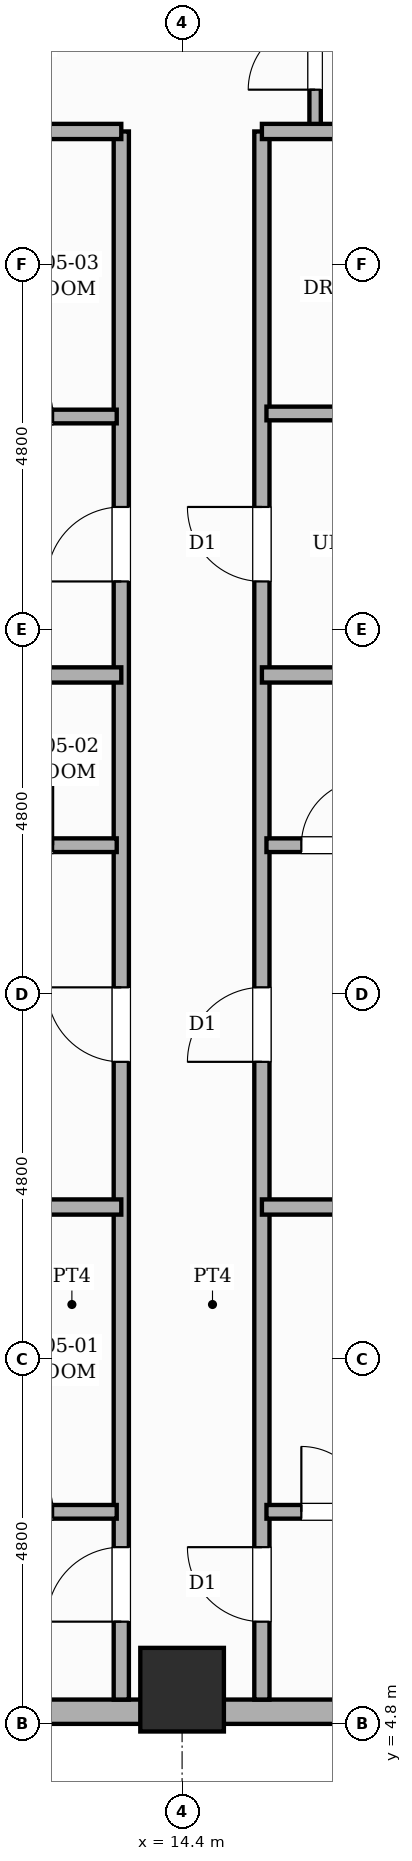
"""IFC4 building model, lengths in metres.
Left out: names, types, materials, properties, quantities, classifications, styles, units other than length and angle.
Written with IfcOpenShell. Run it as: python <this file> out.ifc"""

import sys

from ifc_helpers import new_model, si_unit, direction, frame, frame_2d, origin, origin_2d, place, context, subcontext, project, spatial, rectangle, extrude, element, fill, save


model = new_model("IFC4")
c1 = context("Model", 3, precision=1e-05, world=origin(), true_north=direction((0.0, 1.0)))
c2 = subcontext(c1, "Body", "Model", "MODEL_VIEW")
j1 = project(units=[si_unit("LENGTHUNIT", "METRE"), si_unit("PLANEANGLEUNIT", "RADIAN")], contexts=[c1])
p1 = place(None, origin())
s1 = spatial("IfcSite", under=j1, at=p1, CompositionType="ELEMENT")
p2 = place(p1, origin())
s2 = spatial("IfcBuilding", under=s1, at=p2, CompositionType="ELEMENT")
p3 = place(p2, frame((0.0, 0.0, 25.0)))
s3 = spatial("IfcBuildingStorey", under=s2, at=p3, CompositionType="ELEMENT", Elevation=25.0)
p4 = place(p3, frame((14.4, 5.25, 0.0), z_axis=(0.0, 0.0, 1.0), x_axis=(1.0, 0.0, 0.0)))
e1 = element("IfcColumn", 1, at=p4, inside=s3, PredefinedType="COLUMN", context=c2, shape_type="SweptSolid", body=[
    extrude(rectangle(XDim=1.1, YDim=1.1, at=origin_2d()), origin(), (0.0, 0.0, 1.0), 3.6),
])
p5 = place(p3, frame((21.6, 4.96, 0.0), z_axis=(0.0, 0.0, 1.0), x_axis=(-1.0, 0.0, 0.0)))
e2 = element("IfcWall", 2, at=p5, inside=s3, PredefinedType="STANDARD", context=c2, shape_type="SweptSolid", body=[
    extrude(rectangle(XDim=14.4, YDim=0.32, at=frame_2d((7.2, 0.0))), origin(), (0.0, 0.0, 1.0), 2.53),
])
p6 = place(p5, frame((9.015, 0.0, 0.65)))
e3 = element("IfcOpeningElement", 3, at=p6, cuts=e2, PredefinedType="OPENING", context=c2, shape_type="SweptSolid", body=[
    extrude(rectangle(XDim=1.4, YDim=1.1, at=frame_2d((0.7, 0.55))), frame((0.0, 0.17, 0.0), z_axis=(0.0, -1.0, 0.0), x_axis=(1.0, 0.0, 0.0)), (0.0, 0.0, 1.0), 0.34),
])
p7 = place(p5, frame((0.47, 0.0, 0.45)))
e4 = element("IfcOpeningElement", 4, at=p7, cuts=e2, PredefinedType="OPENING", context=c2, shape_type="SweptSolid", body=[
    extrude(rectangle(XDim=0.95, YDim=1.8, at=frame_2d((0.475, 0.9))), frame((0.0, 0.17, 0.0), z_axis=(0.0, -1.0, 0.0), x_axis=(1.0, 0.0, 0.0)), (0.0, 0.0, 1.0), 0.34),
])
p8 = place(p3, frame((16.15, 25.75, 0.0), z_axis=(0.0, 0.0, 1.0), x_axis=(0.0, 1.0, 0.0)))
e5 = element("IfcWall", 5, at=p8, inside=s3, PredefinedType="PARTITIONING", context=c2, shape_type="SweptSolid", body=[
    extrude(rectangle(XDim=2.25, YDim=0.15, at=frame_2d((1.125, 0.0))), origin(), (0.0, 0.0, 1.0), 3.35),
])
p9 = place(p8, frame((0.55, 0.0, 0.0)))
e6 = element("IfcOpeningElement", 6, at=p9, cuts=e5, PredefinedType="OPENING", context=c2, shape_type="SweptSolid", body=[
    extrude(rectangle(XDim=0.88, YDim=2.1, at=frame_2d((0.44, 1.05))), frame((0.0, 0.085, 0.0), z_axis=(0.0, -1.0, 0.0), x_axis=(1.0, 0.0, 0.0)), (0.0, 0.0, 1.0), 0.17),
])
p10 = place(p3, frame((13.6, 5.12, 0.0), z_axis=(0.0, 0.0, 1.0), x_axis=(0.0, 1.0, 0.0)))
e7 = element("IfcWall", 7, at=p10, inside=s3, PredefinedType="PARTITIONING", context=c2, shape_type="SweptSolid", body=[
    extrude(rectangle(XDim=20.63, YDim=0.2, at=frame_2d((10.315, 0.0))), origin(), (0.0, 0.0, 1.0), 3.35),
])
p11 = place(p10, frame((1.025, 0.0, 0.0)))
e8 = element("IfcOpeningElement", 8, at=p11, cuts=e7, PredefinedType="OPENING", context=c2, shape_type="SweptSolid", body=[
    extrude(rectangle(XDim=0.98, YDim=2.18, at=frame_2d((0.49, 1.09))), frame((0.0, 0.11, 0.0), z_axis=(0.0, -1.0, 0.0), x_axis=(1.0, 0.0, 0.0)), (0.0, 0.0, 1.0), 0.22),
])
p12 = place(p10, frame((8.39, 0.0, 0.0)))
e9 = element("IfcOpeningElement", 9, at=p12, cuts=e7, PredefinedType="OPENING", context=c2, shape_type="SweptSolid", body=[
    extrude(rectangle(XDim=0.98, YDim=2.18, at=frame_2d((0.49, 1.09))), frame((0.0, 0.11, 0.0), z_axis=(0.0, -1.0, 0.0), x_axis=(1.0, 0.0, 0.0)), (0.0, 0.0, 1.0), 0.22),
])
p13 = place(p10, frame((14.71, 0.0, 0.0)))
e10 = element("IfcOpeningElement", 10, at=p13, cuts=e7, PredefinedType="OPENING", context=c2, shape_type="SweptSolid", body=[
    extrude(rectangle(XDim=0.98, YDim=2.18, at=frame_2d((0.49, 1.09))), frame((0.0, 0.11, 0.0), z_axis=(0.0, -1.0, 0.0), x_axis=(1.0, 0.0, 0.0)), (0.0, 0.0, 1.0), 0.22),
])
p14 = place(p3, frame((15.45, 5.12, 0.0), z_axis=(0.0, 0.0, 1.0), x_axis=(0.0, 1.0, 0.0)))
e11 = element("IfcWall", 11, at=p14, inside=s3, PredefinedType="PARTITIONING", context=c2, shape_type="SweptSolid", body=[
    extrude(rectangle(XDim=20.63, YDim=0.2, at=frame_2d((10.315, 0.0))), origin(), (0.0, 0.0, 1.0), 3.35),
])
p15 = place(p14, frame((1.025, 0.0, 0.0)))
e12 = element("IfcOpeningElement", 12, at=p15, cuts=e11, PredefinedType="OPENING", context=c2, shape_type="SweptSolid", body=[
    extrude(rectangle(XDim=0.98, YDim=2.18, at=frame_2d((0.49, 1.09))), frame((0.0, 0.11, 0.0), z_axis=(0.0, -1.0, 0.0), x_axis=(1.0, 0.0, 0.0)), (0.0, 0.0, 1.0), 0.22),
])
p16 = place(p14, frame((8.39, 0.0, 0.0)))
e13 = element("IfcOpeningElement", 13, at=p16, cuts=e11, PredefinedType="OPENING", context=c2, shape_type="SweptSolid", body=[
    extrude(rectangle(XDim=0.98, YDim=2.18, at=frame_2d((0.49, 1.09))), frame((0.0, 0.11, 0.0), z_axis=(0.0, -1.0, 0.0), x_axis=(1.0, 0.0, 0.0)), (0.0, 0.0, 1.0), 0.22),
])
p17 = place(p14, frame((14.71, 0.0, 0.0)))
e14 = element("IfcOpeningElement", 14, at=p17, cuts=e11, PredefinedType="OPENING", context=c2, shape_type="SweptSolid", body=[
    extrude(rectangle(XDim=0.98, YDim=2.18, at=frame_2d((0.49, 1.09))), frame((0.0, 0.11, 0.0), z_axis=(0.0, -1.0, 0.0), x_axis=(1.0, 0.0, 0.0)), (0.0, 0.0, 1.0), 0.22),
])
p18 = place(p3, frame((5.12, 25.75, 0.0), z_axis=(0.0, 0.0, 1.0), x_axis=(1.0, 0.0, 0.0)))
e15 = element("IfcWall", 15, at=p18, inside=s3, PredefinedType="PARTITIONING", context=c2, shape_type="SweptSolid", body=[
    extrude(rectangle(XDim=8.48, YDim=0.2, at=frame_2d((4.24, 0.0))), origin(), (0.0, 0.0, 1.0), 3.35),
])
p19 = place(p3, frame((15.45, 25.75, 0.0), z_axis=(0.0, 0.0, 1.0), x_axis=(1.0, 0.0, 0.0)))
e16 = element("IfcWall", 16, at=p19, inside=s3, PredefinedType="PARTITIONING", context=c2, shape_type="SweptSolid", body=[
    extrude(rectangle(XDim=8.23, YDim=0.2, at=frame_2d((4.115, 0.0))), origin(), (0.0, 0.0, 1.0), 3.35),
])
p20 = place(p3, frame((5.12, 7.59, 0.0), z_axis=(0.0, 0.0, 1.0), x_axis=(1.0, 0.0, 0.0)))
e17 = element("IfcWall", 17, at=p20, inside=s3, PredefinedType="PLUMBINGWALL", context=c2, shape_type="SweptSolid", body=[
    extrude(rectangle(XDim=8.42, YDim=0.18, at=frame_2d((4.21, 0.0))), origin(), (0.0, 0.0, 1.0), 3.35),
])
p21 = place(p20, frame((1.046, 0.0, 0.0)))
e18 = element("IfcOpeningElement", 18, at=p21, cuts=e17, PredefinedType="OPENING", context=c2, shape_type="SweptSolid", body=[
    extrude(rectangle(XDim=0.9, YDim=2.15, at=frame_2d((0.45, 1.075))), frame((0.0, 0.1, 0.0), z_axis=(0.0, -1.0, 0.0), x_axis=(1.0, 0.0, 0.0)), (0.0, 0.0, 1.0), 0.2),
])
p22 = place(p20, frame((4.307, 0.0, 0.0)))
e19 = element("IfcOpeningElement", 19, at=p22, cuts=e17, PredefinedType="OPENING", context=c2, shape_type="SweptSolid", body=[
    extrude(rectangle(XDim=0.9, YDim=2.15, at=frame_2d((0.45, 1.075))), frame((0.0, 0.1, 0.0), z_axis=(0.0, -1.0, 0.0), x_axis=(1.0, 0.0, 0.0)), (0.0, 0.0, 1.0), 0.2),
])
p23 = place(p20, frame((6.723, 0.0, 0.0)))
e20 = element("IfcOpeningElement", 20, at=p23, cuts=e17, PredefinedType="OPENING", context=c2, shape_type="SweptSolid", body=[
    extrude(rectangle(XDim=0.86, YDim=2.1, at=frame_2d((0.43, 1.05))), frame((0.0, 0.1, 0.0), z_axis=(0.0, -1.0, 0.0), x_axis=(1.0, 0.0, 0.0)), (0.0, 0.0, 1.0), 0.2),
])
p24 = place(p3, frame((5.12, 11.6, 0.0), z_axis=(0.0, 0.0, 1.0), x_axis=(1.0, 0.0, 0.0)))
e21 = element("IfcWall", 21, at=p24, inside=s3, PredefinedType="SOLIDWALL", context=c2, shape_type="SweptSolid", body=[
    extrude(rectangle(XDim=8.48, YDim=0.2, at=frame_2d((4.24, 0.0))), origin(), (0.0, 0.0, 1.0), 3.35),
])
p25 = place(p3, frame((5.12, 16.36, 0.0), z_axis=(0.0, 0.0, 1.0), x_axis=(1.0, 0.0, 0.0)))
e22 = element("IfcWall", 22, at=p25, inside=s3, PredefinedType="PLUMBINGWALL", context=c2, shape_type="SweptSolid", body=[
    extrude(rectangle(XDim=8.42, YDim=0.18, at=frame_2d((4.21, 0.0))), origin(), (0.0, 0.0, 1.0), 3.35),
])
p26 = place(p25, frame((1.046, 0.0, 0.0)))
e23 = element("IfcOpeningElement", 23, at=p26, cuts=e22, PredefinedType="OPENING", context=c2, shape_type="SweptSolid", body=[
    extrude(rectangle(XDim=0.9, YDim=2.15, at=frame_2d((0.45, 1.075))), frame((0.0, 0.1, 0.0), z_axis=(0.0, -1.0, 0.0), x_axis=(1.0, 0.0, 0.0)), (0.0, 0.0, 1.0), 0.2),
])
p27 = place(p25, frame((4.307, 0.0, 0.0)))
e24 = element("IfcOpeningElement", 24, at=p27, cuts=e22, PredefinedType="OPENING", context=c2, shape_type="SweptSolid", body=[
    extrude(rectangle(XDim=0.9, YDim=2.15, at=frame_2d((0.45, 1.075))), frame((0.0, 0.1, 0.0), z_axis=(0.0, -1.0, 0.0), x_axis=(1.0, 0.0, 0.0)), (0.0, 0.0, 1.0), 0.2),
])
p28 = place(p25, frame((6.723, 0.0, 0.0)))
e25 = element("IfcOpeningElement", 25, at=p28, cuts=e22, PredefinedType="OPENING", context=c2, shape_type="SweptSolid", body=[
    extrude(rectangle(XDim=0.86, YDim=2.1, at=frame_2d((0.43, 1.05))), frame((0.0, 0.1, 0.0), z_axis=(0.0, -1.0, 0.0), x_axis=(1.0, 0.0, 0.0)), (0.0, 0.0, 1.0), 0.2),
])
p29 = place(p3, frame((5.12, 18.6, 0.0), z_axis=(0.0, 0.0, 1.0), x_axis=(1.0, 0.0, 0.0)))
e26 = element("IfcWall", 26, at=p29, inside=s3, PredefinedType="SOLIDWALL", context=c2, shape_type="SweptSolid", body=[
    extrude(rectangle(XDim=8.48, YDim=0.2, at=frame_2d((4.24, 0.0))), origin(), (0.0, 0.0, 1.0), 3.35),
])
p30 = place(p3, frame((5.12, 22.0, 0.0), z_axis=(0.0, 0.0, 1.0), x_axis=(1.0, 0.0, 0.0)))
e27 = element("IfcWall", 27, at=p30, inside=s3, PredefinedType="PLUMBINGWALL", context=c2, shape_type="SweptSolid", body=[
    extrude(rectangle(XDim=8.42, YDim=0.18, at=frame_2d((4.21, 0.0))), origin(), (0.0, 0.0, 1.0), 3.35),
])
p31 = place(p30, frame((1.046, 0.0, 0.0)))
e28 = element("IfcOpeningElement", 28, at=p31, cuts=e27, PredefinedType="OPENING", context=c2, shape_type="SweptSolid", body=[
    extrude(rectangle(XDim=0.9, YDim=2.15, at=frame_2d((0.45, 1.075))), frame((0.0, 0.1, 0.0), z_axis=(0.0, -1.0, 0.0), x_axis=(1.0, 0.0, 0.0)), (0.0, 0.0, 1.0), 0.2),
])
p32 = place(p30, frame((4.307, 0.0, 0.0)))
e29 = element("IfcOpeningElement", 29, at=p32, cuts=e27, PredefinedType="OPENING", context=c2, shape_type="SweptSolid", body=[
    extrude(rectangle(XDim=0.9, YDim=2.15, at=frame_2d((0.45, 1.075))), frame((0.0, 0.1, 0.0), z_axis=(0.0, -1.0, 0.0), x_axis=(1.0, 0.0, 0.0)), (0.0, 0.0, 1.0), 0.2),
])
p33 = place(p30, frame((6.723, 0.0, 0.0)))
e30 = element("IfcOpeningElement", 30, at=p33, cuts=e27, PredefinedType="OPENING", context=c2, shape_type="SweptSolid", body=[
    extrude(rectangle(XDim=0.86, YDim=2.1, at=frame_2d((0.43, 1.05))), frame((0.0, 0.1, 0.0), z_axis=(0.0, -1.0, 0.0), x_axis=(1.0, 0.0, 0.0)), (0.0, 0.0, 1.0), 0.2),
])
p34 = place(p3, frame((15.51, 7.59, 0.0), z_axis=(0.0, 0.0, 1.0), x_axis=(1.0, 0.0, 0.0)))
e31 = element("IfcWall", 31, at=p34, inside=s3, PredefinedType="PLUMBINGWALL", context=c2, shape_type="SweptSolid", body=[
    extrude(rectangle(XDim=8.17, YDim=0.18, at=frame_2d((4.085, 0.0))), origin(), (0.0, 0.0, 1.0), 3.35),
])
p35 = place(p34, frame((0.459, 0.0, 0.0)))
e32 = element("IfcOpeningElement", 32, at=p35, cuts=e31, PredefinedType="OPENING", context=c2, shape_type="SweptSolid", body=[
    extrude(rectangle(XDim=0.86, YDim=2.1, at=frame_2d((0.43, 1.05))), frame((0.0, 0.1, 0.0), z_axis=(0.0, -1.0, 0.0), x_axis=(1.0, 0.0, 0.0)), (0.0, 0.0, 1.0), 0.2),
])
p36 = place(p34, frame((2.722, 0.0, 0.0)))
e33 = element("IfcOpeningElement", 33, at=p36, cuts=e31, PredefinedType="OPENING", context=c2, shape_type="SweptSolid", body=[
    extrude(rectangle(XDim=0.9, YDim=2.15, at=frame_2d((0.45, 1.075))), frame((0.0, 0.1, 0.0), z_axis=(0.0, -1.0, 0.0), x_axis=(1.0, 0.0, 0.0)), (0.0, 0.0, 1.0), 0.2),
])
p37 = place(p34, frame((5.766, 0.0, 0.0)))
e34 = element("IfcOpeningElement", 34, at=p37, cuts=e31, PredefinedType="OPENING", context=c2, shape_type="SweptSolid", body=[
    extrude(rectangle(XDim=0.9, YDim=2.15, at=frame_2d((0.45, 1.075))), frame((0.0, 0.1, 0.0), z_axis=(0.0, -1.0, 0.0), x_axis=(1.0, 0.0, 0.0)), (0.0, 0.0, 1.0), 0.2),
])
p38 = place(p3, frame((15.45, 11.6, 0.0), z_axis=(0.0, 0.0, 1.0), x_axis=(1.0, 0.0, 0.0)))
e35 = element("IfcWall", 35, at=p38, inside=s3, PredefinedType="SOLIDWALL", context=c2, shape_type="SweptSolid", body=[
    extrude(rectangle(XDim=8.23, YDim=0.2, at=frame_2d((4.115, 0.0))), origin(), (0.0, 0.0, 1.0), 3.35),
])
p39 = place(p3, frame((15.51, 16.36, 0.0), z_axis=(0.0, 0.0, 1.0), x_axis=(1.0, 0.0, 0.0)))
e36 = element("IfcWall", 36, at=p39, inside=s3, PredefinedType="PLUMBINGWALL", context=c2, shape_type="SweptSolid", body=[
    extrude(rectangle(XDim=8.17, YDim=0.18, at=frame_2d((4.085, 0.0))), origin(), (0.0, 0.0, 1.0), 3.35),
])
p40 = place(p39, frame((0.459, 0.0, 0.0)))
e37 = element("IfcOpeningElement", 37, at=p40, cuts=e36, PredefinedType="OPENING", context=c2, shape_type="SweptSolid", body=[
    extrude(rectangle(XDim=0.86, YDim=2.1, at=frame_2d((0.43, 1.05))), frame((0.0, 0.1, 0.0), z_axis=(0.0, -1.0, 0.0), x_axis=(1.0, 0.0, 0.0)), (0.0, 0.0, 1.0), 0.2),
])
p41 = place(p39, frame((2.722, 0.0, 0.0)))
e38 = element("IfcOpeningElement", 38, at=p41, cuts=e36, PredefinedType="OPENING", context=c2, shape_type="SweptSolid", body=[
    extrude(rectangle(XDim=0.9, YDim=2.15, at=frame_2d((0.45, 1.075))), frame((0.0, 0.1, 0.0), z_axis=(0.0, -1.0, 0.0), x_axis=(1.0, 0.0, 0.0)), (0.0, 0.0, 1.0), 0.2),
])
p42 = place(p39, frame((5.766, 0.0, 0.0)))
e39 = element("IfcOpeningElement", 39, at=p42, cuts=e36, PredefinedType="OPENING", context=c2, shape_type="SweptSolid", body=[
    extrude(rectangle(XDim=0.9, YDim=2.15, at=frame_2d((0.45, 1.075))), frame((0.0, 0.1, 0.0), z_axis=(0.0, -1.0, 0.0), x_axis=(1.0, 0.0, 0.0)), (0.0, 0.0, 1.0), 0.2),
])
p43 = place(p3, frame((15.45, 18.6, 0.0), z_axis=(0.0, 0.0, 1.0), x_axis=(1.0, 0.0, 0.0)))
e40 = element("IfcWall", 40, at=p43, inside=s3, PredefinedType="SOLIDWALL", context=c2, shape_type="SweptSolid", body=[
    extrude(rectangle(XDim=8.23, YDim=0.2, at=frame_2d((4.115, 0.0))), origin(), (0.0, 0.0, 1.0), 3.35),
])
p44 = place(p3, frame((15.51, 22.04, 0.0), z_axis=(0.0, 0.0, 1.0), x_axis=(1.0, 0.0, 0.0)))
e41 = element("IfcWall", 41, at=p44, inside=s3, PredefinedType="PLUMBINGWALL", context=c2, shape_type="SweptSolid", body=[
    extrude(rectangle(XDim=8.17, YDim=0.18, at=frame_2d((4.085, 0.0))), origin(), (0.0, 0.0, 1.0), 3.35),
])
p45 = place(p44, frame((1.154, 0.0, 0.0)))
e42 = element("IfcOpeningElement", 42, at=p45, cuts=e41, PredefinedType="OPENING", context=c2, shape_type="SweptSolid", body=[
    extrude(rectangle(XDim=0.9, YDim=2.15, at=frame_2d((0.45, 1.075))), frame((0.0, 0.1, 0.0), z_axis=(0.0, -1.0, 0.0), x_axis=(1.0, 0.0, 0.0)), (0.0, 0.0, 1.0), 0.2),
])
p46 = place(p44, frame((4.116, 0.0, 0.0)))
e43 = element("IfcOpeningElement", 43, at=p46, cuts=e41, PredefinedType="OPENING", context=c2, shape_type="SweptSolid", body=[
    extrude(rectangle(XDim=0.9, YDim=2.15, at=frame_2d((0.45, 1.075))), frame((0.0, 0.1, 0.0), z_axis=(0.0, -1.0, 0.0), x_axis=(1.0, 0.0, 0.0)), (0.0, 0.0, 1.0), 0.2),
])
p47 = place(p44, frame((6.553, 0.0, 0.0)))
e44 = element("IfcOpeningElement", 44, at=p47, cuts=e41, PredefinedType="OPENING", context=c2, shape_type="SweptSolid", body=[
    extrude(rectangle(XDim=0.86, YDim=2.1, at=frame_2d((0.43, 1.05))), frame((0.0, 0.1, 0.0), z_axis=(0.0, -1.0, 0.0), x_axis=(1.0, 0.0, 0.0)), (0.0, 0.0, 1.0), 0.2),
])
p48 = place(p9, origin())
e45 = element("IfcDoor", 45, at=p48, inside=s3, OperationType="SINGLE_SWING_LEFT", PredefinedType="DOOR", context=c2, shape_type="SweptSolid", body=[
    extrude(rectangle(XDim=0.88, YDim=2.1, at=frame_2d((0.44, 1.05))), frame((0.0, 0.025, 0.0), z_axis=(0.0, -1.0, 0.0), x_axis=(1.0, 0.0, 0.0)), (0.0, 0.0, 1.0), 0.05),
])
fill(e6, e45)
p49 = place(p11, origin())
e46 = element("IfcDoor", 46, at=p49, inside=s3, OperationType="SINGLE_SWING_LEFT", PredefinedType="DOOR", context=c2, shape_type="SweptSolid", body=[
    extrude(rectangle(XDim=0.98, YDim=2.18, at=frame_2d((0.49, 1.09))), frame((0.0, 0.025, 0.0), z_axis=(0.0, -1.0, 0.0), x_axis=(1.0, 0.0, 0.0)), (0.0, 0.0, 1.0), 0.05),
])
fill(e8, e46)
p50 = place(p23, origin())
e47 = element("IfcDoor", 47, at=p50, inside=s3, OperationType="SINGLE_SWING_LEFT", PredefinedType="DOOR", context=c2, shape_type="SweptSolid", body=[
    extrude(rectangle(XDim=0.86, YDim=2.1, at=frame_2d((0.43, 1.05))), frame((0.0, 0.025, 0.0), z_axis=(0.0, -1.0, 0.0), x_axis=(1.0, 0.0, 0.0)), (0.0, 0.0, 1.0), 0.05),
])
fill(e20, e47)
p51 = place(p12, origin())
e48 = element("IfcDoor", 48, at=p51, inside=s3, OperationType="SINGLE_SWING_RIGHT", PredefinedType="DOOR", context=c2, shape_type="SweptSolid", body=[
    extrude(rectangle(XDim=0.98, YDim=2.18, at=frame_2d((0.49, 1.09))), frame((0.0, 0.025, 0.0), z_axis=(0.0, -1.0, 0.0), x_axis=(1.0, 0.0, 0.0)), (0.0, 0.0, 1.0), 0.05),
])
fill(e9, e48)
p52 = place(p28, origin())
e49 = element("IfcDoor", 49, at=p52, inside=s3, OperationType="SINGLE_SWING_RIGHT", PredefinedType="DOOR", context=c2, shape_type="SweptSolid", body=[
    extrude(rectangle(XDim=0.86, YDim=2.1, at=frame_2d((0.43, 1.05))), frame((0.0, 0.025, 0.0), z_axis=(0.0, -1.0, 0.0), x_axis=(1.0, 0.0, 0.0)), (0.0, 0.0, 1.0), 0.05),
])
fill(e25, e49)
p53 = place(p13, origin())
e50 = element("IfcDoor", 50, at=p53, inside=s3, OperationType="SINGLE_SWING_LEFT", PredefinedType="DOOR", context=c2, shape_type="SweptSolid", body=[
    extrude(rectangle(XDim=0.98, YDim=2.18, at=frame_2d((0.49, 1.09))), frame((0.0, 0.025, 0.0), z_axis=(0.0, -1.0, 0.0), x_axis=(1.0, 0.0, 0.0)), (0.0, 0.0, 1.0), 0.05),
])
fill(e10, e50)
p54 = place(p33, origin())
e51 = element("IfcDoor", 51, at=p54, inside=s3, OperationType="SINGLE_SWING_LEFT", PredefinedType="DOOR", context=c2, shape_type="SweptSolid", body=[
    extrude(rectangle(XDim=0.86, YDim=2.1, at=frame_2d((0.43, 1.05))), frame((0.0, 0.025, 0.0), z_axis=(0.0, -1.0, 0.0), x_axis=(1.0, 0.0, 0.0)), (0.0, 0.0, 1.0), 0.05),
])
fill(e30, e51)
p55 = place(p15, origin())
e52 = element("IfcDoor", 52, at=p55, inside=s3, OperationType="SINGLE_SWING_RIGHT", PredefinedType="DOOR", context=c2, shape_type="SweptSolid", body=[
    extrude(rectangle(XDim=0.98, YDim=2.18, at=frame_2d((0.49, 1.09))), frame((0.0, 0.025, 0.0), z_axis=(0.0, -1.0, 0.0), x_axis=(1.0, 0.0, 0.0)), (0.0, 0.0, 1.0), 0.05),
])
fill(e12, e52)
p56 = place(p35, origin())
e53 = element("IfcDoor", 53, at=p56, inside=s3, OperationType="SINGLE_SWING_LEFT", PredefinedType="DOOR", context=c2, shape_type="SweptSolid", body=[
    extrude(rectangle(XDim=0.86, YDim=2.1, at=frame_2d((0.43, 1.05))), frame((0.0, 0.025, 0.0), z_axis=(0.0, -1.0, 0.0), x_axis=(1.0, 0.0, 0.0)), (0.0, 0.0, 1.0), 0.05),
])
fill(e32, e53)
p57 = place(p16, origin())
e54 = element("IfcDoor", 54, at=p57, inside=s3, OperationType="SINGLE_SWING_LEFT", PredefinedType="DOOR", context=c2, shape_type="SweptSolid", body=[
    extrude(rectangle(XDim=0.98, YDim=2.18, at=frame_2d((0.49, 1.09))), frame((0.0, 0.025, 0.0), z_axis=(0.0, -1.0, 0.0), x_axis=(1.0, 0.0, 0.0)), (0.0, 0.0, 1.0), 0.05),
])
fill(e13, e54)
p58 = place(p40, origin())
e55 = element("IfcDoor", 55, at=p58, inside=s3, OperationType="SINGLE_SWING_RIGHT", PredefinedType="DOOR", context=c2, shape_type="SweptSolid", body=[
    extrude(rectangle(XDim=0.86, YDim=2.1, at=frame_2d((0.43, 1.05))), frame((0.0, 0.025, 0.0), z_axis=(0.0, -1.0, 0.0), x_axis=(1.0, 0.0, 0.0)), (0.0, 0.0, 1.0), 0.05),
])
fill(e37, e55)
p59 = place(p17, origin())
e56 = element("IfcDoor", 56, at=p59, inside=s3, OperationType="SINGLE_SWING_RIGHT", PredefinedType="DOOR", context=c2, shape_type="SweptSolid", body=[
    extrude(rectangle(XDim=0.98, YDim=2.18, at=frame_2d((0.49, 1.09))), frame((0.0, 0.025, 0.0), z_axis=(0.0, -1.0, 0.0), x_axis=(1.0, 0.0, 0.0)), (0.0, 0.0, 1.0), 0.05),
])
fill(e14, e56)
save(model, sys.argv[1])
